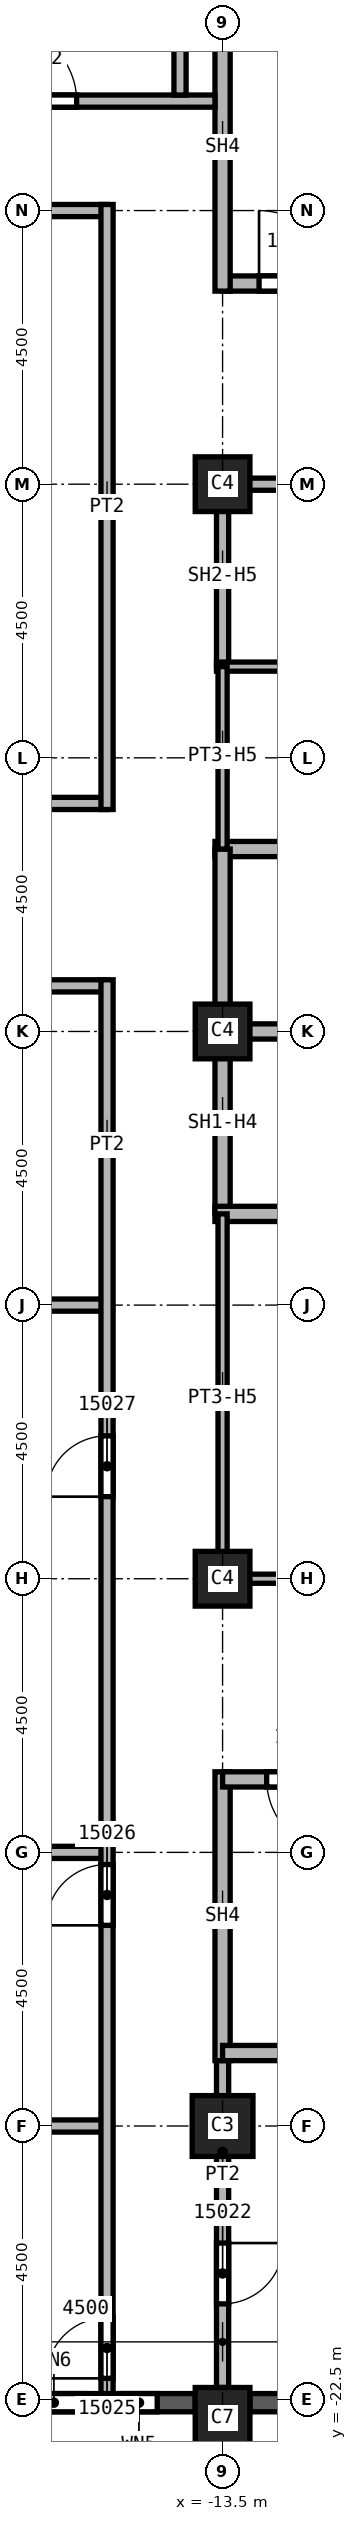
"""IFC4 building model, lengths in metres.
Left out: names, types, materials, properties, quantities, classifications, styles, units other than length and angle.
Written with IfcOpenShell. Run it as: python <this file> out.ifc"""

import sys

from ifc_helpers import new_model, si_unit, direction, frame, frame_2d, origin, origin_2d, place, context, subcontext, project, spatial, rectangle, extrude, element, fill, save


model = new_model("IFC4")
c1 = context("Model", 3, precision=1e-05, world=origin(), true_north=direction((0.0, 1.0)))
c2 = subcontext(c1, "Body", "Model", "MODEL_VIEW")
j1 = project(units=[si_unit("LENGTHUNIT", "METRE"), si_unit("PLANEANGLEUNIT", "RADIAN")], contexts=[c1])
p1 = place(None, origin())
s1 = spatial("IfcSite", under=j1, at=p1, CompositionType="ELEMENT")
p2 = place(p1, origin())
s2 = spatial("IfcBuilding", under=s1, at=p2, CompositionType="ELEMENT")
p3 = place(p2, frame((0.0, 0.0, 232.0)))
s3 = spatial("IfcBuildingStorey", under=s2, at=p3, CompositionType="ELEMENT", Elevation=232.0)
p4 = place(p3, frame((-13.5, -18.0, 0.0), z_axis=(0.0, 0.0, 1.0), x_axis=(1.0, 0.0, 0.0)))
e1 = element("IfcColumn", 1, at=p4, inside=s3, PredefinedType="COLUMN", context=c2, shape_type="SweptSolid", body=[
    extrude(rectangle(XDim=1.0, YDim=1.0, at=origin_2d()), origin(), (0.0, 0.0, 1.0), 3.6),
])
for number, where, z_axis, x_axis in (
    (2, (-13.5, 0.0, 0.0), (0.0, 0.0, 1.0), (1.0, 0.0, 0.0)),
    (3, (-13.5, 9.0, 0.0), (0.0, 0.0, 1.0), (1.0, 0.0, 0.0)),
    (4, (-13.5, -9.0, 0.0), (0.0, 0.0, 1.0), (1.0, 0.0, 0.0)),
):
    element("IfcColumn", number, at=place(p3, frame(where, z_axis=z_axis, x_axis=x_axis)), inside=s3, PredefinedType="COLUMN", context=c2, shape_type="SweptSolid", body=[
        extrude(rectangle(XDim=0.9, YDim=0.9, at=origin_2d()), origin(), (0.0, 0.0, 1.0), 3.6),
    ])
p5 = place(p3, frame((-13.5, -22.8, 0.0), z_axis=(0.0, 0.0, 1.0), x_axis=(1.0, 0.0, 0.0)))
e5 = element("IfcColumn", 5, at=p5, inside=s3, PredefinedType="COLUMN", context=c2, shape_type="SweptSolid", body=[
    extrude(rectangle(XDim=0.9, YDim=1.0, at=origin_2d()), origin(), (0.0, 0.0, 1.0), 3.6),
])
p6 = place(p3, frame((-17.55, -22.55, 0.0), z_axis=(0.0, 0.0, 1.0), x_axis=(1.0, 0.0, 0.0)))
e6 = element("IfcWall", 6, at=p6, inside=s3, PredefinedType="SOLIDWALL", context=c2, shape_type="SweptSolid", body=[
    extrude(rectangle(XDim=3.6, YDim=0.3, at=frame_2d((1.8, 0.0))), origin(), (0.0, 0.0, 1.0), 3.0),
])
p7 = place(p6, frame((0.775, 0.0, 0.8)))
e7 = element("IfcOpeningElement", 7, at=p7, cuts=e6, PredefinedType="OPENING", context=c2, shape_type="SweptSolid", body=[
    extrude(rectangle(XDim=1.0, YDim=1.95, at=frame_2d((0.5, 0.975))), frame((0.0, 0.15, 0.0), z_axis=(0.0, -1.0, 0.0), x_axis=(1.0, 0.0, 0.0)), (0.0, 0.0, 1.0), 0.3),
])
p8 = place(p6, frame((2.375, 0.0, 0.8)))
e8 = element("IfcOpeningElement", 8, at=p8, cuts=e6, PredefinedType="OPENING", context=c2, shape_type="SweptSolid", body=[
    extrude(rectangle(XDim=0.6, YDim=1.95, at=frame_2d((0.3, 0.975))), frame((0.0, 0.15, 0.0), z_axis=(0.0, -1.0, 0.0), x_axis=(1.0, 0.0, 0.0)), (0.0, 0.0, 1.0), 0.3),
])
p9 = place(p3, frame((-13.05, -22.55, 0.0), z_axis=(0.0, 0.0, 1.0), x_axis=(1.0, 0.0, 0.0)))
e9 = element("IfcWall", 9, at=p9, inside=s3, PredefinedType="SOLIDWALL", context=c2, shape_type="SweptSolid", body=[
    extrude(rectangle(XDim=3.6, YDim=0.3, at=frame_2d((1.8, 0.0))), origin(), (0.0, 0.0, 1.0), 3.0),
])
p10 = place(p9, frame((0.6, 0.0, 0.8)))
e10 = element("IfcOpeningElement", 10, at=p10, cuts=e9, PredefinedType="OPENING", context=c2, shape_type="SweptSolid", body=[
    extrude(rectangle(XDim=2.4, YDim=1.95, at=frame_2d((1.2, 0.975))), frame((0.0, 0.15, 0.0), z_axis=(0.0, -1.0, 0.0), x_axis=(1.0, 0.0, 0.0)), (0.0, 0.0, 1.0), 0.3),
])
p11 = place(p3, frame((-33.85, 3.75, 0.0), z_axis=(0.0, 0.0, 1.0), x_axis=(1.0, 0.0, 0.0)))
e11 = element("IfcWall", 11, at=p11, inside=s3, PredefinedType="PARTITIONING", context=c2, shape_type="SweptSolid", body=[
    extrude(rectangle(XDim=18.45, YDim=0.2, at=frame_2d((9.225, 0.0))), origin(), (0.0, 0.0, 1.0), 3.6),
])
p12 = place(p11, frame((11.2, 0.0, 0.0)))
e12 = element("IfcOpeningElement", 12, at=p12, cuts=e11, PredefinedType="OPENING", context=c2, shape_type="SweptSolid", body=[
    extrude(rectangle(XDim=1.0, YDim=2.1, at=frame_2d((0.5, 1.05))), frame((0.0, 0.1, 0.0), z_axis=(0.0, -1.0, 0.0), x_axis=(1.0, 0.0, 0.0)), (0.0, 0.0, 1.0), 0.2),
])
p13 = place(p3, frame((-15.4, 0.75, 0.0), z_axis=(0.0, 0.0, 1.0), x_axis=(-1.0, 0.0, 0.0)))
e13 = element("IfcWall", 13, at=p13, inside=s3, PredefinedType="PARTITIONING", context=c2, shape_type="SweptSolid", body=[
    extrude(rectangle(XDim=18.45, YDim=0.2, at=frame_2d((9.225, 0.0))), origin(), (0.0, 0.0, 1.0), 3.6),
])
p14 = place(p13, frame((5.35, 0.0, 0.0)))
e14 = element("IfcOpeningElement", 14, at=p14, cuts=e13, PredefinedType="OPENING", context=c2, shape_type="SweptSolid", body=[
    extrude(rectangle(XDim=1.0, YDim=2.1, at=frame_2d((0.5, 1.05))), frame((0.0, 0.1, 0.0), z_axis=(0.0, -1.0, 0.0), x_axis=(1.0, 0.0, 0.0)), (0.0, 0.0, 1.0), 0.2),
])
p15 = place(p13, frame((12.35, 0.0, 0.0)))
e15 = element("IfcOpeningElement", 15, at=p15, cuts=e13, PredefinedType="OPENING", context=c2, shape_type="SweptSolid", body=[
    extrude(rectangle(XDim=1.0, YDim=2.1, at=frame_2d((0.5, 1.05))), frame((0.0, 0.1, 0.0), z_axis=(0.0, -1.0, 0.0), x_axis=(1.0, 0.0, 0.0)), (0.0, 0.0, 1.0), 0.2),
])
p16 = place(p3, frame((-27.1, -4.5, 0.0), z_axis=(0.0, 0.0, 1.0), x_axis=(1.0, 0.0, 0.0)))
e16 = element("IfcWall", 16, at=p16, inside=s3, PredefinedType="PARTITIONING", context=c2, shape_type="SweptSolid", body=[
    extrude(rectangle(XDim=11.7, YDim=0.2, at=frame_2d((5.85, 0.0))), origin(), (0.0, 0.0, 1.0), 3.6),
])
p17 = place(p3, frame((-24.25, -18.0, 0.0), z_axis=(0.0, 0.0, 1.0), x_axis=(1.0, 0.0, 0.0)))
e17 = element("IfcWall", 17, at=p17, inside=s3, PredefinedType="PARTITIONING", context=c2, shape_type="SweptSolid", body=[
    extrude(rectangle(XDim=8.85, YDim=0.2, at=frame_2d((4.425, 0.0))), origin(), (0.0, 0.0, 1.0), 3.6),
])
p18 = place(p3, frame((-20.75, -13.5, 0.0), z_axis=(0.0, 0.0, 1.0), x_axis=(1.0, 0.0, 0.0)))
e18 = element("IfcWall", 18, at=p18, inside=s3, PredefinedType="PARTITIONING", context=c2, shape_type="SweptSolid", body=[
    extrude(rectangle(XDim=5.35, YDim=0.2, at=frame_2d((2.675, 0.0))), origin(), (0.0, 0.0, 1.0), 3.6),
])
p19 = place(p3, frame((-15.4, 13.5, 0.0), z_axis=(0.0, 0.0, 1.0), x_axis=(-1.0, 0.0, 0.0)))
e19 = element("IfcWall", 19, at=p19, inside=s3, PredefinedType="PARTITIONING", context=c2, shape_type="SweptSolid", body=[
    extrude(rectangle(XDim=6.6, YDim=0.2, at=frame_2d((3.3, 0.0))), origin(), (0.0, 0.0, 1.0), 3.6),
])
p20 = place(p19, frame((5.37, 0.0, 0.0)))
e20 = element("IfcOpeningElement", 20, at=p20, cuts=e19, PredefinedType="OPENING", context=c2, shape_type="SweptSolid", body=[
    extrude(rectangle(XDim=0.9, YDim=2.1, at=frame_2d((0.45, 1.05))), frame((0.0, 0.1, 0.0), z_axis=(0.0, -1.0, 0.0), x_axis=(1.0, 0.0, 0.0)), (0.0, 0.0, 1.0), 0.2),
])
p21 = place(p3, frame((-15.4, -22.4, 0.0), z_axis=(0.0, 0.0, 1.0), x_axis=(0.0, 1.0, 0.0)))
e21 = element("IfcWall", 21, at=p21, inside=s3, PredefinedType="PARTITIONING", context=c2, shape_type="SweptSolid", body=[
    extrude(rectangle(XDim=23.25, YDim=0.2, at=frame_2d((11.625, 0.0))), origin(), (0.0, 0.0, 1.0), 3.6),
])
p22 = place(p21, frame((0.25, 0.0, 0.0)))
e22 = element("IfcOpeningElement", 22, at=p22, cuts=e21, PredefinedType="OPENING", context=c2, shape_type="SweptSolid", body=[
    extrude(rectangle(XDim=1.0, YDim=2.1, at=frame_2d((0.5, 1.05))), frame((0.0, 0.1, 0.0), z_axis=(0.0, -1.0, 0.0), x_axis=(1.0, 0.0, 0.0)), (0.0, 0.0, 1.0), 0.2),
])
p23 = place(p21, frame((7.7, 0.0, 0.0)))
e23 = element("IfcOpeningElement", 23, at=p23, cuts=e21, PredefinedType="OPENING", context=c2, shape_type="SweptSolid", body=[
    extrude(rectangle(XDim=1.0, YDim=2.1, at=frame_2d((0.5, 1.05))), frame((0.0, 0.1, 0.0), z_axis=(0.0, -1.0, 0.0), x_axis=(1.0, 0.0, 0.0)), (0.0, 0.0, 1.0), 0.2),
])
p24 = place(p21, frame((14.75, 0.0, 0.0)))
e24 = element("IfcOpeningElement", 24, at=p24, cuts=e21, PredefinedType="OPENING", context=c2, shape_type="SweptSolid", body=[
    extrude(rectangle(XDim=1.0, YDim=2.1, at=frame_2d((0.5, 1.05))), frame((0.0, 0.1, 0.0), z_axis=(0.0, -1.0, 0.0), x_axis=(1.0, 0.0, 0.0)), (0.0, 0.0, 1.0), 0.2),
])
p25 = place(p3, frame((-15.4, 3.65, 0.0), z_axis=(0.0, 0.0, 1.0), x_axis=(0.0, 1.0, 0.0)))
e25 = element("IfcWall", 25, at=p25, inside=s3, PredefinedType="PARTITIONING", context=c2, shape_type="SweptSolid", body=[
    extrude(rectangle(XDim=9.95, YDim=0.2, at=frame_2d((4.975, 0.0))), origin(), (0.0, 0.0, 1.0), 3.6),
])
p26 = place(p3, frame((-13.5, -16.675, 0.0), z_axis=(0.0, 0.0, 1.0), x_axis=(0.0, -1.0, 0.0)))
e26 = element("IfcWall", 26, at=p26, inside=s3, PredefinedType="PARTITIONING", context=c2, shape_type="SweptSolid", body=[
    extrude(rectangle(XDim=5.625, YDim=0.2, at=frame_2d((2.812, 0.0))), origin(), (0.0, 0.0, 1.0), 3.6),
])
p27 = place(p26, frame((3.25, 0.0, 0.0)))
e27 = element("IfcOpeningElement", 27, at=p27, cuts=e26, PredefinedType="OPENING", context=c2, shape_type="SweptSolid", body=[
    extrude(rectangle(XDim=1.0, YDim=2.1, at=frame_2d((0.5, 1.05))), frame((0.0, 0.1, 0.0), z_axis=(0.0, -1.0, 0.0), x_axis=(1.0, 0.0, 0.0)), (0.0, 0.0, 1.0), 0.2),
])
p28 = place(p3, frame((-13.5, 6.0, 0.0), z_axis=(0.0, 0.0, 1.0), x_axis=(0.0, 1.0, 0.0)))
e28 = element("IfcWall", 28, at=p28, inside=s3, PredefinedType="SOLIDWALL", context=c2, shape_type="SweptSolid", body=[
    extrude(rectangle(XDim=3.1, YDim=0.2, at=frame_2d((1.55, 0.0))), origin(), (0.0, 0.0, 1.0), 2.838),
])
p29 = place(p3, frame((-13.5, 9.0, 0.0), z_axis=(0.0, 0.0, 1.0), x_axis=(1.0, 0.0, 0.0)))
e29 = element("IfcWall", 29, at=p29, inside=s3, PredefinedType="SOLIDWALL", context=c2, shape_type="SweptSolid", body=[
    extrude(rectangle(XDim=3.0, YDim=0.2, at=frame_2d((1.5, 0.0))), origin(), (0.0, 0.0, 1.0), 2.838),
])
p30 = place(p3, frame((-13.625, 0.0, 0.0), z_axis=(0.0, 0.0, 1.0), x_axis=(1.0, 0.0, 0.0)))
e30 = element("IfcWall", 30, at=p30, inside=s3, PredefinedType="SOLIDWALL", context=c2, shape_type="SweptSolid", body=[
    extrude(rectangle(XDim=3.125, YDim=0.25, at=frame_2d((1.562, 0.0))), origin(), (0.0, 0.0, 1.0), 3.6),
])
p31 = place(p3, frame((-13.625, 3.0, 0.0), z_axis=(0.0, 0.0, 1.0), x_axis=(1.0, 0.0, 0.0)))
e31 = element("IfcWall", 31, at=p31, inside=s3, PredefinedType="SOLIDWALL", context=c2, shape_type="SweptSolid", body=[
    extrude(rectangle(XDim=9.25, YDim=0.25, at=frame_2d((4.625, 0.0))), origin(), (0.0, 0.0, 1.0), 3.6),
])
p32 = place(p31, frame((3.25, 0.0, 0.0)))
e32 = element("IfcOpeningElement", 32, at=p32, cuts=e31, PredefinedType="OPENING", context=c2, shape_type="SweptSolid", body=[
    extrude(rectangle(XDim=1.1, YDim=2.1, at=frame_2d((0.55, 1.05))), frame((0.0, 0.125, 0.0), z_axis=(0.0, -1.0, 0.0), x_axis=(1.0, 0.0, 0.0)), (0.0, 0.0, 1.0), 0.25),
])
p33 = place(p3, frame((-13.5, -3.0, 0.0), z_axis=(0.0, 0.0, 1.0), x_axis=(0.0, 1.0, 0.0)))
e33 = element("IfcWall", 33, at=p33, inside=s3, PredefinedType="SOLIDWALL", context=c2, shape_type="SweptSolid", body=[
    extrude(rectangle(XDim=6.0, YDim=0.25, at=frame_2d((3.0, 0.0))), origin(), (0.0, 0.0, 1.0), 2.838),
])
p34 = place(p3, frame((-13.625, -3.0, 0.0), z_axis=(0.0, 0.0, 1.0), x_axis=(1.0, 0.0, 0.0)))
e34 = element("IfcWall", 34, at=p34, inside=s3, PredefinedType="SOLIDWALL", context=c2, shape_type="SweptSolid", body=[
    extrude(rectangle(XDim=6.125, YDim=0.25, at=frame_2d((3.062, 0.0))), origin(), (0.0, 0.0, 1.0), 3.6),
])
p35 = place(p34, frame((3.25, 0.0, 0.0)))
e35 = element("IfcOpeningElement", 35, at=p35, cuts=e34, PredefinedType="OPENING", context=c2, shape_type="SweptSolid", body=[
    extrude(rectangle(XDim=1.1, YDim=2.1, at=frame_2d((0.55, 1.05))), frame((0.0, 0.125, 0.0), z_axis=(0.0, -1.0, 0.0), x_axis=(1.0, 0.0, 0.0)), (0.0, 0.0, 1.0), 0.25),
])
p36 = place(p3, frame((-13.5, -12.175, 0.0), z_axis=(0.0, 0.0, 1.0), x_axis=(0.0, -1.0, 0.0)))
e36 = element("IfcWall", 36, at=p36, inside=s3, PredefinedType="SOLIDWALL", context=c2, shape_type="SweptSolid", body=[
    extrude(rectangle(XDim=4.75, YDim=0.25, at=frame_2d((2.375, 0.0))), origin(), (0.0, 0.0, 1.0), 3.6),
])
p37 = place(p3, frame((-13.5, 12.3, 0.0), z_axis=(0.0, 0.0, 1.0), x_axis=(1.0, 0.0, 0.0)))
e37 = element("IfcWall", 37, at=p37, inside=s3, PredefinedType="SOLIDWALL", context=c2, shape_type="SweptSolid", body=[
    extrude(rectangle(XDim=9.125, YDim=0.25, at=frame_2d((4.562, 0.0))), origin(), (0.0, 0.0, 1.0), 3.6),
])
p38 = place(p37, frame((0.6, 0.0, 0.0)))
e38 = element("IfcOpeningElement", 38, at=p38, cuts=e37, PredefinedType="OPENING", context=c2, shape_type="SweptSolid", body=[
    extrude(rectangle(XDim=1.2, YDim=2.1, at=frame_2d((0.6, 1.05))), frame((0.0, 0.125, 0.0), z_axis=(0.0, -1.0, 0.0), x_axis=(1.0, 0.0, 0.0)), (0.0, 0.0, 1.0), 0.25),
])
p39 = place(p3, frame((-13.5, 16.78, 0.0), z_axis=(0.0, 0.0, 1.0), x_axis=(0.0, -1.0, 0.0)))
e39 = element("IfcWall", 39, at=p39, inside=s3, PredefinedType="SOLIDWALL", context=c2, shape_type="SweptSolid", body=[
    extrude(rectangle(XDim=4.605, YDim=0.25, at=frame_2d((2.302, 0.0))), origin(), (0.0, 0.0, 1.0), 3.6),
])
p40 = place(p3, frame((-4.5, -16.8, 0.0), z_axis=(0.0, 0.0, 1.0), x_axis=(-1.0, 0.0, 0.0)))
e40 = element("IfcWall", 40, at=p40, inside=s3, PredefinedType="SOLIDWALL", context=c2, shape_type="SweptSolid", body=[
    extrude(rectangle(XDim=9.0, YDim=0.25, at=frame_2d((4.5, 0.0))), origin(), (0.0, 0.0, 1.0), 3.6),
])
p41 = place(p3, frame((-4.375, -12.3, 0.0), z_axis=(0.0, 0.0, 1.0), x_axis=(-1.0, 0.0, 0.0)))
e41 = element("IfcWall", 41, at=p41, inside=s3, PredefinedType="SOLIDWALL", context=c2, shape_type="SweptSolid", body=[
    extrude(rectangle(XDim=9.125, YDim=0.25, at=frame_2d((4.562, 0.0))), origin(), (0.0, 0.0, 1.0), 3.6),
])
p42 = place(p41, frame((7.2, 0.0, 0.0)))
e42 = element("IfcOpeningElement", 42, at=p42, cuts=e41, PredefinedType="OPENING", context=c2, shape_type="SweptSolid", body=[
    extrude(rectangle(XDim=1.2, YDim=2.1, at=frame_2d((0.6, 1.05))), frame((0.0, 0.125, 0.0), z_axis=(0.0, -1.0, 0.0), x_axis=(1.0, 0.0, 0.0)), (0.0, 0.0, 1.0), 0.25),
])
p43 = place(p3, frame((-13.6, 6.0, 0.0), z_axis=(0.0, 0.0, 1.0), x_axis=(1.0, 0.0, 0.0)))
e43 = element("IfcWall", 43, at=p43, inside=s3, PredefinedType="PARTITIONING", context=c2, shape_type="SweptSolid", body=[
    extrude(rectangle(XDim=3.1, YDim=0.15, at=frame_2d((1.55, 0.0))), origin(), (0.0, 0.0, 1.0), 3.6),
])
p44 = place(p3, frame((-13.5, -9.075, 0.0), z_axis=(0.0, 0.0, 1.0), x_axis=(0.0, 1.0, 0.0)))
e44 = element("IfcWall", 44, at=p44, inside=s3, PredefinedType="PARTITIONING", context=c2, shape_type="SweptSolid", body=[
    extrude(rectangle(XDim=6.075, YDim=0.15, at=frame_2d((3.038, 0.0))), origin(), (0.0, 0.0, 1.0), 2.838),
])
for number, where, z_axis, x_axis in (
    (45, (-13.5, 3.0, 0.0), (0.0, 0.0, 1.0), (0.0, 1.0, 0.0)),
    (46, (-10.5, -9.0, 0.0), (0.0, 0.0, 1.0), (-1.0, 0.0, 0.0)),
):
    element("IfcWall", number, at=place(p3, frame(where, z_axis=z_axis, x_axis=x_axis)), inside=s3, PredefinedType="PARTITIONING", context=c2, shape_type="SweptSolid", body=[
        extrude(rectangle(XDim=3.0, YDim=0.15, at=frame_2d((1.5, 0.0))), origin(), (0.0, 0.0, 1.0), 2.838),
    ])
p45 = place(p3, frame((-21.9, 15.3, 0.0), z_axis=(0.0, 0.0, 1.0), x_axis=(1.0, 0.0, 0.0)))
e47 = element("IfcWall", 47, at=p45, inside=s3, PredefinedType="SOLIDWALL", context=c2, shape_type="SweptSolid", body=[
    extrude(rectangle(XDim=8.275, YDim=0.2, at=frame_2d((4.137, 0.0))), origin(), (0.0, 0.0, 1.0), 3.6),
])
p46 = place(p45, frame((4.8, 0.0, 0.0)))
e48 = element("IfcOpeningElement", 48, at=p46, cuts=e47, PredefinedType="OPENING", context=c2, shape_type="SweptSolid", body=[
    extrude(rectangle(XDim=1.2, YDim=2.1, at=frame_2d((0.6, 1.05))), frame((0.0, 0.1, 0.0), z_axis=(0.0, -1.0, 0.0), x_axis=(1.0, 0.0, 0.0)), (0.0, 0.0, 1.0), 0.2),
])
p47 = place(p3, frame((-14.2, 15.4, 0.0), z_axis=(0.0, 0.0, 1.0), x_axis=(0.0, 1.0, 0.0)))
e49 = element("IfcWall", 49, at=p47, inside=s3, PredefinedType="SOLIDWALL", context=c2, shape_type="SweptSolid", body=[
    extrude(rectangle(XDim=5.9, YDim=0.2, at=frame_2d((2.95, 0.0))), origin(), (0.0, 0.0, 1.0), 3.6),
])
p48 = place(p38, origin())
e50 = element("IfcDoor", 50, at=p48, inside=s3, OperationType="SINGLE_SWING_RIGHT", PredefinedType="DOOR", context=c2, shape_type="SweptSolid", body=[
    extrude(rectangle(XDim=1.2, YDim=2.1, at=frame_2d((0.6, 1.05))), frame((0.0, 0.025, 0.0), z_axis=(0.0, -1.0, 0.0), x_axis=(1.0, 0.0, 0.0)), (0.0, 0.0, 1.0), 0.05),
])
fill(e38, e50)
p49 = place(p42, origin())
e51 = element("IfcDoor", 51, at=p49, inside=s3, OperationType="SINGLE_SWING_LEFT", PredefinedType="DOOR", context=c2, shape_type="SweptSolid", body=[
    extrude(rectangle(XDim=1.2, YDim=2.1, at=frame_2d((0.6, 1.05))), frame((0.0, 0.025, 0.0), z_axis=(0.0, -1.0, 0.0), x_axis=(1.0, 0.0, 0.0)), (0.0, 0.0, 1.0), 0.05),
])
fill(e42, e51)
p50 = place(p27, origin())
e52 = element("IfcDoor", 52, at=p50, inside=s3, OperationType="SINGLE_SWING_LEFT", PredefinedType="DOOR", context=c2, shape_type="SweptSolid", body=[
    extrude(rectangle(XDim=1.0, YDim=2.1, at=frame_2d((0.5, 1.05))), frame((0.0, 0.025, 0.0), z_axis=(0.0, -1.0, 0.0), x_axis=(1.0, 0.0, 0.0)), (0.0, 0.0, 1.0), 0.05),
])
fill(e27, e52)
p51 = place(p22, origin())
e53 = element("IfcDoor", 53, at=p51, inside=s3, OperationType="SINGLE_SWING_RIGHT", PredefinedType="DOOR", context=c2, shape_type="SweptSolid", body=[
    extrude(rectangle(XDim=1.0, YDim=2.1, at=frame_2d((0.5, 1.05))), frame((0.0, 0.025, 0.0), z_axis=(0.0, -1.0, 0.0), x_axis=(1.0, 0.0, 0.0)), (0.0, 0.0, 1.0), 0.05),
])
fill(e22, e53)
p52 = place(p23, origin())
e54 = element("IfcDoor", 54, at=p52, inside=s3, OperationType="SINGLE_SWING_LEFT", PredefinedType="DOOR", context=c2, shape_type="SweptSolid", body=[
    extrude(rectangle(XDim=1.0, YDim=2.1, at=frame_2d((0.5, 1.05))), frame((0.0, 0.025, 0.0), z_axis=(0.0, -1.0, 0.0), x_axis=(1.0, 0.0, 0.0)), (0.0, 0.0, 1.0), 0.05),
])
fill(e23, e54)
p53 = place(p24, origin())
e55 = element("IfcDoor", 55, at=p53, inside=s3, OperationType="SINGLE_SWING_RIGHT", PredefinedType="DOOR", context=c2, shape_type="SweptSolid", body=[
    extrude(rectangle(XDim=1.0, YDim=2.1, at=frame_2d((0.5, 1.05))), frame((0.0, 0.025, 0.0), z_axis=(0.0, -1.0, 0.0), x_axis=(1.0, 0.0, 0.0)), (0.0, 0.0, 1.0), 0.05),
])
fill(e24, e55)
p54 = place(p46, origin())
e56 = element("IfcDoor", 56, at=p54, inside=s3, OperationType="SINGLE_SWING_RIGHT", PredefinedType="DOOR", context=c2, shape_type="SweptSolid", body=[
    extrude(rectangle(XDim=1.2, YDim=2.1, at=frame_2d((0.6, 1.05))), frame((0.0, 0.025, 0.0), z_axis=(0.0, -1.0, 0.0), x_axis=(1.0, 0.0, 0.0)), (0.0, 0.0, 1.0), 0.05),
])
fill(e48, e56)
p55 = place(p7, origin())
e57 = element("IfcWindow", 57, at=p55, inside=s3, PartitioningType="SINGLE_PANEL", PredefinedType="WINDOW", context=c2, shape_type="SweptSolid", body=[
    extrude(rectangle(XDim=1.0, YDim=1.95, at=frame_2d((0.5, 0.975))), frame((0.0, 0.03, 0.0), z_axis=(0.0, -1.0, 0.0), x_axis=(1.0, 0.0, 0.0)), (0.0, 0.0, 1.0), 0.06),
])
fill(e7, e57)
p56 = place(p8, origin())
e58 = element("IfcWindow", 58, at=p56, inside=s3, PartitioningType="SINGLE_PANEL", PredefinedType="WINDOW", context=c2, shape_type="SweptSolid", body=[
    extrude(rectangle(XDim=0.6, YDim=1.95, at=frame_2d((0.3, 0.975))), frame((0.0, 0.03, 0.0), z_axis=(0.0, -1.0, 0.0), x_axis=(1.0, 0.0, 0.0)), (0.0, 0.0, 1.0), 0.06),
])
fill(e8, e58)
save(model, sys.argv[1])
